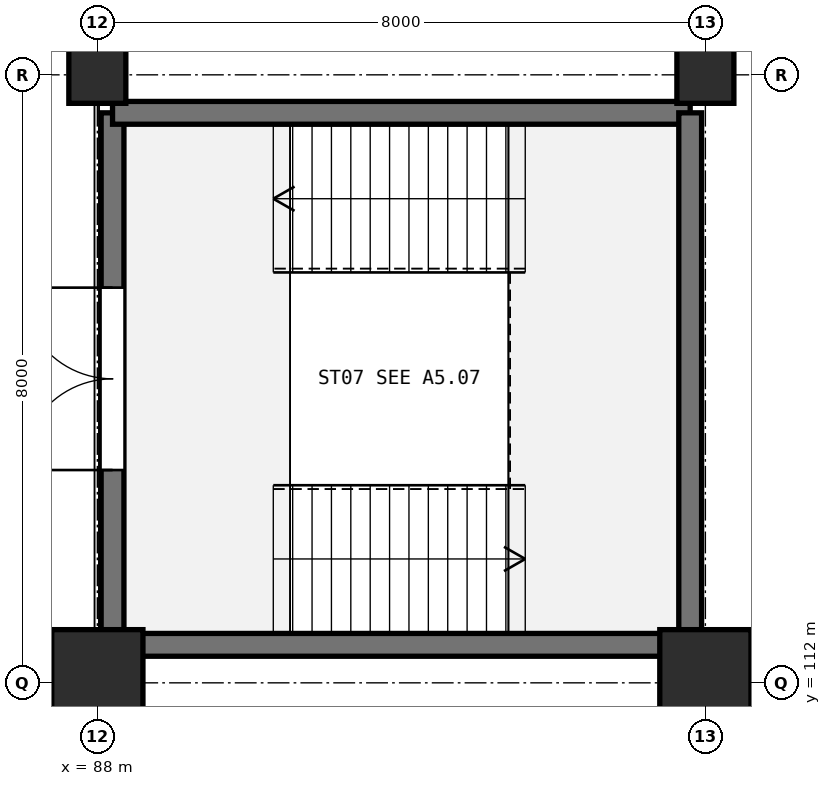
"""IFC4 building model, lengths in metres.
Left out: names, types, materials, properties, quantities, classifications, styles, units other than length and angle.
Written with IfcOpenShell. Run it as: python <this file> out.ifc"""

import sys

from ifc_helpers import new_model, si_unit, direction, frame, frame_2d, origin, origin_2d, place, context, subcontext, project, spatial, rectangle, extrude, element, fill, save


model = new_model("IFC4")
c1 = context("Model", 3, precision=1e-05, world=origin(), true_north=direction((0.0, 1.0)))
c2 = subcontext(c1, "Body", "Model", "MODEL_VIEW")
j1 = project(units=[si_unit("LENGTHUNIT", "METRE"), si_unit("PLANEANGLEUNIT", "RADIAN")], contexts=[c1])
p1 = place(None, origin())
s1 = spatial("IfcSite", under=j1, at=p1, CompositionType="ELEMENT")
p2 = place(p1, origin())
s2 = spatial("IfcBuilding", under=s1, at=p2, CompositionType="ELEMENT")
p3 = place(p2, frame((0.0, 0.0, -4.8)))
s3 = spatial("IfcBuildingStorey", under=s2, at=p3, CompositionType="ELEMENT", Elevation=-4.8)
p4 = place(p3, frame((88.0, 112.0, 0.0), z_axis=(0.0, 0.0, 1.0), x_axis=(1.0, 0.0, 0.0)))
e1 = element("IfcColumn", 1, at=p4, inside=s3, PredefinedType="COLUMN", context=c2, shape_type="SweptSolid", body=[
    extrude(rectangle(XDim=1.2, YDim=1.4, at=origin_2d()), origin(), (0.0, 0.0, 1.0), 4.8),
])
p5 = place(p3, frame((88.0, 120.0, 0.0), z_axis=(0.0, 0.0, 1.0), x_axis=(1.0, 0.0, 0.0)))
e2 = element("IfcColumn", 2, at=p5, inside=s3, PredefinedType="COLUMN", context=c2, shape_type="SweptSolid", body=[
    extrude(rectangle(XDim=0.75, YDim=0.75, at=origin_2d()), origin(), (0.0, 0.0, 1.0), 4.8),
])
p6 = place(p3, frame((96.0, 112.0, 0.0), z_axis=(0.0, 0.0, 1.0), x_axis=(1.0, 0.0, 0.0)))
e3 = element("IfcColumn", 3, at=p6, inside=s3, PredefinedType="COLUMN", context=c2, shape_type="SweptSolid", body=[
    extrude(rectangle(XDim=1.2, YDim=1.4, at=origin_2d()), origin(), (0.0, 0.0, 1.0), 4.8),
])
p7 = place(p3, frame((96.0, 120.0, 0.0), z_axis=(0.0, 0.0, 1.0), x_axis=(1.0, 0.0, 0.0)))
e4 = element("IfcColumn", 4, at=p7, inside=s3, PredefinedType="COLUMN", context=c2, shape_type="SweptSolid", body=[
    extrude(rectangle(XDim=0.75, YDim=0.75, at=origin_2d()), origin(), (0.0, 0.0, 1.0), 4.8),
])
p8 = place(p3, frame((95.8, 112.5, 0.0), z_axis=(0.0, 0.0, 1.0), x_axis=(-1.0, 0.0, 0.0)))
e5 = element("IfcWall", 5, at=p8, inside=s3, PredefinedType="SHEAR", context=c2, shape_type="SweptSolid", body=[
    extrude(rectangle(XDim=7.6, YDim=0.3, at=frame_2d((3.8, 0.0))), origin(), (0.0, 0.0, 1.0), 4.46),
])
p9 = place(p3, frame((88.2, 112.5, 0.0), z_axis=(0.0, 0.0, 1.0), x_axis=(0.0, 1.0, 0.0)))
e6 = element("IfcWall", 6, at=p9, inside=s3, PredefinedType="SHEAR", context=c2, shape_type="SweptSolid", body=[
    extrude(rectangle(XDim=7.0, YDim=0.3, at=frame_2d((3.5, 0.0))), origin(), (0.0, 0.0, 1.0), 4.46),
])
p10 = place(p9, frame((2.3, 0.0, 0.0)))
e7 = element("IfcOpeningElement", 7, at=p10, cuts=e6, PredefinedType="OPENING", context=c2, shape_type="SweptSolid", body=[
    extrude(rectangle(XDim=2.4, YDim=2.2, at=frame_2d((1.2, 1.1))), frame((0.0, 0.16, 0.0), z_axis=(0.0, -1.0, 0.0), x_axis=(1.0, 0.0, 0.0)), (0.0, 0.0, 1.0), 0.32),
])
p11 = place(p3, frame((88.2, 119.5, 0.0), z_axis=(0.0, 0.0, 1.0), x_axis=(1.0, 0.0, 0.0)))
e8 = element("IfcWall", 8, at=p11, inside=s3, PredefinedType="SHEAR", context=c2, shape_type="SweptSolid", body=[
    extrude(rectangle(XDim=7.6, YDim=0.3, at=frame_2d((3.8, 0.0))), origin(), (0.0, 0.0, 1.0), 4.46),
])
p12 = place(p3, frame((95.8, 119.5, 0.0), z_axis=(0.0, 0.0, 1.0), x_axis=(0.0, -1.0, 0.0)))
e9 = element("IfcWall", 9, at=p12, inside=s3, PredefinedType="SHEAR", context=c2, shape_type="SweptSolid", body=[
    extrude(rectangle(XDim=7.0, YDim=0.3, at=frame_2d((3.5, 0.0))), origin(), (0.0, 0.0, 1.0), 4.46),
])
p13 = place(p10, frame((2.4, 0.0, 0.0), z_axis=(0.0, 0.0, 1.0), x_axis=(-1.0, 0.0, 0.0)))
e10 = element("IfcDoor", 10, at=p13, inside=s3, OperationType="DOUBLE_DOOR_SINGLE_SWING", PredefinedType="DOOR", context=c2, shape_type="SweptSolid", body=[
    extrude(rectangle(XDim=2.4, YDim=2.2, at=frame_2d((1.2, 1.1))), frame((0.0, 0.025, 0.0), z_axis=(0.0, -1.0, 0.0), x_axis=(1.0, 0.0, 0.0)), (0.0, 0.0, 1.0), 0.05),
])
fill(e7, e10)
save(model, sys.argv[1])
